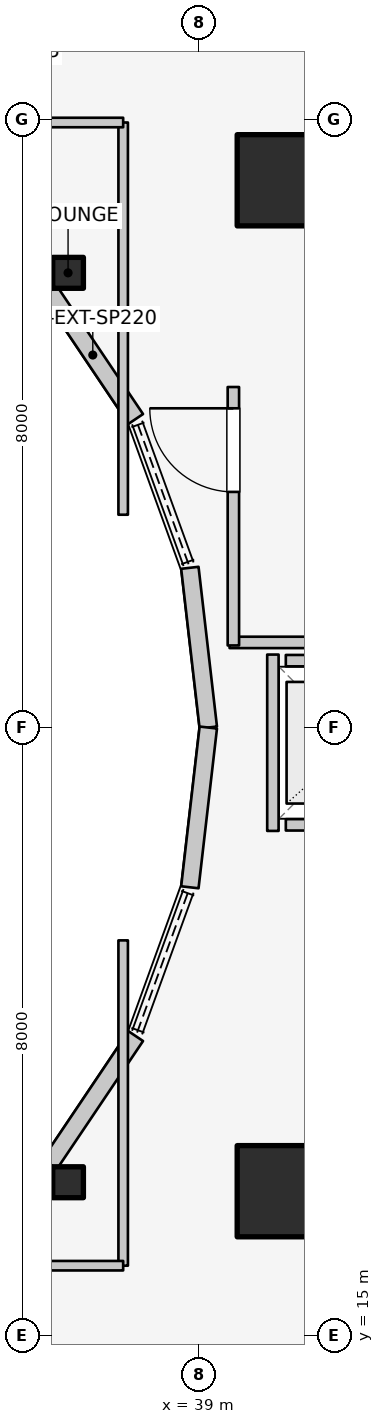
"""IFC4 building model, lengths in metres.
Left out: names, types, materials, properties, quantities, classifications, styles, units other than length and angle.
Written with IfcOpenShell. Run it as: python <this file> out.ifc"""

import sys

from ifc_helpers import new_model, si_unit, direction, frame, frame_2d, origin, origin_2d, place, context, subcontext, project, spatial, rectangle, i_section, extrude, element, fill, save


model = new_model("IFC4")
c1 = context("Model", 3, precision=1e-05, world=origin(), true_north=direction((0.0, 1.0)))
c2 = subcontext(c1, "Body", "Model", "MODEL_VIEW")
j1 = project(units=[si_unit("LENGTHUNIT", "METRE"), si_unit("PLANEANGLEUNIT", "RADIAN")], contexts=[c1])
p1 = place(None, origin())
s1 = spatial("IfcSite", under=j1, at=p1, CompositionType="ELEMENT")
p2 = place(p1, origin())
s2 = spatial("IfcBuilding", under=s1, at=p2, CompositionType="ELEMENT")
p3 = place(p2, frame((0.0, 0.0, 253.2)))
s3 = spatial("IfcBuildingStorey", under=s2, at=p3, CompositionType="ELEMENT", Elevation=253.2)
for number, where, z_axis, x_axis in (
    (1, (39.85, 16.55, 0.0), (0.0, 0.0, 1.0), (1.0, 0.0, 0.0)),
    (2, (39.85, 30.35, 0.0), (0.0, 0.0, 1.0), (1.0, 0.0, 0.0)),
):
    element("IfcWall", number, at=place(p3, frame(where, z_axis=z_axis, x_axis=x_axis)), inside=s3, PredefinedType="SHEAR", context=c2, shape_type="SweptSolid", body=[
        extrude(rectangle(XDim=4.5, YDim=0.45, at=frame_2d((2.25, 0.0))), origin(), (0.0, 0.0, 1.0), 3.6),
    ])
for number, where, z_axis, x_axis in (
    (3, (40.1, 16.9, 0.0), (0.0, 0.0, 1.0), (1.0, 0.0, 0.0)),
    (4, (40.1, 30.2, 0.0), (0.0, 0.0, 1.0), (1.0, 0.0, 0.0)),
):
    element("IfcColumn", number, at=place(p3, frame(where, z_axis=z_axis, x_axis=x_axis)), inside=s3, PredefinedType="COLUMN", context=c2, shape_type="SweptSolid", body=[
        extrude(rectangle(XDim=1.2, YDim=1.2, at=origin_2d()), origin(), (0.0, 0.0, 1.0), 3.6),
    ])
for number, where, z_axis, x_axis in (
    (5, (37.275, 28.982, 0.0), (0.0, 0.0, 1.0), (1.0, 0.0, 0.0)),
    (6, (37.275, 17.018, 0.0), (0.0, 0.0, 1.0), (1.0, 0.0, 0.0)),
):
    element("IfcColumn", number, at=place(p3, frame(where, z_axis=z_axis, x_axis=x_axis)), inside=s3, PredefinedType="COLUMN", context=c2, shape_type="SweptSolid", body=[
        extrude(i_section(OverallWidth=0.404, OverallDepth=0.407, WebThickness=0.027, FlangeThickness=0.044, FilletRadius=0.025, at=origin_2d()), origin(), (0.0, 0.0, 1.0), 3.6),
    ])
p4 = place(p3, frame((39.12, 23.0, 0.0), z_axis=(0.0, 0.0, 1.0), x_axis=(-0.114711713601, 0.993398823617, 0.0)))
e7 = element("IfcWall", 7, at=p4, inside=s3, PredefinedType="STANDARD", context=c2, shape_type="SweptSolid", body=[
    extrude(rectangle(XDim=2.115, YDim=0.23, at=frame_2d((1.058, 0.0))), origin(), (0.0, 0.0, 1.0), 3.28),
])
p5 = place(p3, frame((38.166, 27.06, 0.0), z_axis=(0.0, 0.0, 1.0), x_axis=(-0.558197800898, 0.829707909492, 0.0)))
e8 = element("IfcWall", 8, at=p5, inside=s3, PredefinedType="STANDARD", context=c2, shape_type="SweptSolid", body=[
    extrude(rectangle(XDim=2.027, YDim=0.23, at=frame_2d((1.013, 0.0))), origin(), (0.0, 0.0, 1.0), 2.6),
])
for number, where, z_axis, x_axis in (
    (9, (37.035, 28.742, 0.0), (0.0, 0.0, 1.0), (-0.753, 0.659, 0.0)),
    (10, (35.56, 15.968, 0.0), (0.0, 0.0, 1.0), (0.753, 0.659, 0.0)),
):
    element("IfcWall", number, at=place(p3, frame(where, z_axis=z_axis, x_axis=x_axis)), inside=s3, PredefinedType="STANDARD", context=c2, shape_type="SweptSolid", body=[
        extrude(rectangle(XDim=1.959, YDim=0.23, at=frame_2d((0.98, 0.0))), origin(), (0.0, 0.0, 1.0), 2.6),
    ])
p6 = place(p3, frame((37.035, 17.258, 0.0), z_axis=(0.0, 0.0, 1.0), x_axis=(0.558197800898, 0.829707909492, 0.0)))
e11 = element("IfcWall", 11, at=p6, inside=s3, PredefinedType="STANDARD", context=c2, shape_type="SweptSolid", body=[
    extrude(rectangle(XDim=2.027, YDim=0.23, at=frame_2d((1.013, 0.0))), origin(), (0.0, 0.0, 1.0), 2.6),
])
p7 = place(p3, frame((38.877, 20.898, 0.0), z_axis=(0.0, 0.0, 1.0), x_axis=(0.114711713601, 0.993398823617, 0.0)))
e12 = element("IfcWall", 12, at=p7, inside=s3, PredefinedType="STANDARD", context=c2, shape_type="SweptSolid", body=[
    extrude(rectangle(XDim=2.115, YDim=0.23, at=frame_2d((1.058, 0.0))), origin(), (0.0, 0.0, 1.0), 3.28),
])
p8 = place(p3, frame((40.14, 21.72, 0.0), z_axis=(0.0, 0.0, 1.0), x_axis=(1.0, 0.0, 0.0)))
e13 = element("IfcWall", 13, at=p8, inside=s3, PredefinedType="SOLIDWALL", context=c2, shape_type="SweptSolid", body=[
    extrude(rectangle(XDim=1.82, YDim=0.15, at=frame_2d((0.91, 0.0))), origin(), (0.0, 0.0, 1.0), 2.62),
])
p9 = place(p8, frame((0.36, 0.0, 0.0)))
e14 = element("IfcOpeningElement", 14, at=p9, cuts=e13, PredefinedType="OPENING", context=c2, shape_type="SweptSolid", body=[
    extrude(rectangle(XDim=1.1, YDim=2.1, at=frame_2d((0.55, 1.05))), frame((0.0, 0.085, 0.0), z_axis=(0.0, -1.0, 0.0), x_axis=(1.0, 0.0, 0.0)), (0.0, 0.0, 1.0), 0.17),
])
p10 = place(p3, frame((40.14, 23.88, 0.0), z_axis=(0.0, 0.0, 1.0), x_axis=(1.0, 0.0, 0.0)))
e15 = element("IfcWall", 15, at=p10, inside=s3, PredefinedType="SOLIDWALL", context=c2, shape_type="SweptSolid", body=[
    extrude(rectangle(XDim=1.82, YDim=0.15, at=frame_2d((0.91, 0.0))), origin(), (0.0, 0.0, 1.0), 2.62),
])
p11 = place(p3, frame((39.97, 21.64, 0.0), z_axis=(0.0, 0.0, 1.0), x_axis=(0.0, 1.0, 0.0)))
e16 = element("IfcWall", 16, at=p11, inside=s3, PredefinedType="SOLIDWALL", context=c2, shape_type="SweptSolid", body=[
    extrude(rectangle(XDim=2.32, YDim=0.15, at=frame_2d((1.16, 0.0))), origin(), (0.0, 0.0, 1.0), 2.62),
])
p12 = place(p3, frame((39.4, 24.12, 0.0), z_axis=(0.0, 0.0, 1.0), x_axis=(1.0, 0.0, 0.0)))
e17 = element("IfcWall", 17, at=p12, inside=s3, PredefinedType="PARTITIONING", context=c2, shape_type="SweptSolid", body=[
    extrude(rectangle(XDim=5.08, YDim=0.15, at=frame_2d((2.54, 0.0))), origin(), (0.0, 0.0, 1.0), 2.62),
])
p13 = place(p3, frame((39.45, 24.08, 0.0), z_axis=(0.0, 0.0, 1.0), x_axis=(0.0, 1.0, 0.0)))
e18 = element("IfcWall", 18, at=p13, inside=s3, PredefinedType="PARTITIONING", context=c2, shape_type="SweptSolid", body=[
    extrude(rectangle(XDim=3.4, YDim=0.15, at=frame_2d((1.7, 0.0))), origin(), (0.0, 0.0, 1.0), 3.295),
])
p14 = place(p13, frame((2.02, 0.0, 0.0)))
e19 = element("IfcOpeningElement", 19, at=p14, cuts=e18, PredefinedType="OPENING", context=c2, shape_type="SweptSolid", body=[
    extrude(rectangle(XDim=1.1, YDim=2.1, at=frame_2d((0.55, 1.05))), frame((0.0, 0.085, 0.0), z_axis=(0.0, -1.0, 0.0), x_axis=(1.0, 0.0, 0.0)), (0.0, 0.0, 1.0), 0.17),
])
p15 = place(p3, frame((35.55, 30.015, 0.0), z_axis=(0.0, 0.0, 1.0), x_axis=(0.522763432117, 0.852477796802, 0.0)))
e20 = element("IfcWall", 20, at=p15, inside=s3, PredefinedType="PARTITIONING", context=c2, shape_type="SweptSolid", body=[
    extrude(rectangle(XDim=3.269, YDim=0.125, at=frame_2d((1.635, 0.0))), origin(), (0.0, 0.0, 1.0), 2.672),
])
p16 = place(p3, frame((35.55, 15.985, 0.0), z_axis=(0.0, 0.0, 1.0), x_axis=(0.52592395012, -0.850531597702, 0.0)))
e21 = element("IfcWall", 21, at=p16, inside=s3, PredefinedType="PARTITIONING", context=c2, shape_type="SweptSolid", body=[
    extrude(rectangle(XDim=2.869, YDim=0.125, at=frame_2d((1.435, 0.0))), origin(), (0.0, 0.0, 1.0), 2.672),
])
p17 = place(p3, frame((38.0, 25.8, 0.0), z_axis=(0.0, 0.0, 1.0), x_axis=(0.0, 1.0, 0.0)))
e22 = element("IfcWall", 22, at=p17, inside=s3, PredefinedType="PARTITIONING", context=c2, shape_type="SweptSolid", body=[
    extrude(rectangle(XDim=5.16, YDim=0.125, at=frame_2d((2.58, 0.0))), origin(), (0.0, 0.0, 1.0), 2.672),
])
p18 = place(p3, frame((35.4, 30.96, 0.0), z_axis=(0.0, 0.0, 1.0), x_axis=(1.0, 0.0, 0.0)))
e23 = element("IfcWall", 23, at=p18, inside=s3, PredefinedType="PARTITIONING", context=c2, shape_type="SweptSolid", body=[
    extrude(rectangle(XDim=2.6, YDim=0.125, at=frame_2d((1.3, 0.0))), origin(), (0.0, 0.0, 1.0), 2.816),
])
p19 = place(p3, frame((38.0, 15.92, 0.0), z_axis=(0.0, 0.0, 1.0), x_axis=(0.0, 1.0, 0.0)))
e24 = element("IfcWall", 24, at=p19, inside=s3, PredefinedType="PARTITIONING", context=c2, shape_type="SweptSolid", body=[
    extrude(rectangle(XDim=4.28, YDim=0.125, at=frame_2d((2.14, 0.0))), origin(), (0.0, 0.0, 1.0), 2.672),
])
p20 = place(p3, frame((35.4, 15.92, 0.0), z_axis=(0.0, 0.0, 1.0), x_axis=(1.0, 0.0, 0.0)))
e25 = element("IfcWall", 25, at=p20, inside=s3, PredefinedType="PARTITIONING", context=c2, shape_type="SweptSolid", body=[
    extrude(rectangle(XDim=2.6, YDim=0.125, at=frame_2d((1.3, 0.0))), origin(), (0.0, 0.0, 1.0), 2.672),
])
p21 = place(p14, origin())
e26 = element("IfcDoor", 26, at=p21, inside=s3, OperationType="SINGLE_SWING_RIGHT", PredefinedType="DOOR", context=c2, shape_type="SweptSolid", body=[
    extrude(rectangle(XDim=1.1, YDim=2.1, at=frame_2d((0.55, 1.05))), frame((0.0, 0.025, 0.0), z_axis=(0.0, -1.0, 0.0), x_axis=(1.0, 0.0, 0.0)), (0.0, 0.0, 1.0), 0.05),
])
fill(e19, e26)
save(model, sys.argv[1])
